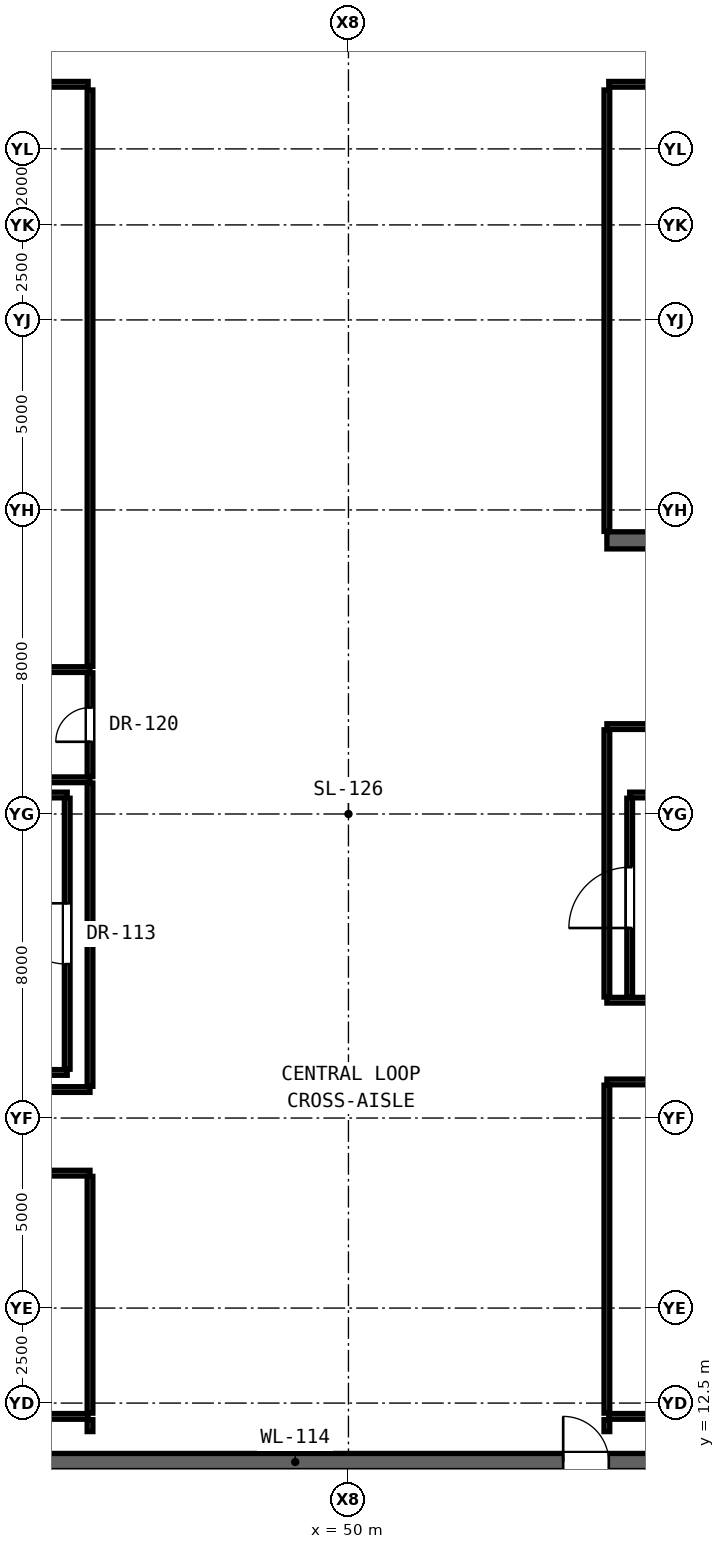
"""IFC4 building model, lengths in metres.
Left out: names, types, materials, properties, quantities, classifications, styles, units other than length and angle.
Written with IfcOpenShell. Run it as: python <this file> out.ifc"""

import sys

from ifc_helpers import new_model, si_unit, direction, frame, frame_2d, origin, place, context, subcontext, project, spatial, rectangle, extrude, element, fill, save


model = new_model("IFC4")
c1 = context("Model", 3, precision=1e-05, world=origin(), true_north=direction((0.0, 1.0)))
c2 = subcontext(c1, "Body", "Model", "MODEL_VIEW")
j1 = project(units=[si_unit("LENGTHUNIT", "METRE"), si_unit("PLANEANGLEUNIT", "RADIAN")], contexts=[c1])
p1 = place(None, origin())
s1 = spatial("IfcSite", under=j1, at=p1, CompositionType="ELEMENT")
p2 = place(p1, origin())
s2 = spatial("IfcBuilding", under=s1, at=p2, CompositionType="ELEMENT")
p3 = place(p2, frame((0.0, 0.0, -4.8)))
s3 = spatial("IfcBuildingStorey", under=s2, at=p3, CompositionType="ELEMENT", Elevation=-4.8)
p4 = place(p3, frame((3.2, 10.95, 0.0), z_axis=(0.0, 0.0, 1.0), x_axis=(1.0, 0.0, 0.0)))
e1 = element("IfcWall", 1, at=p4, inside=s3, PredefinedType="SHEAR", context=c2, shape_type="SweptSolid", body=[
    extrude(rectangle(XDim=90.8, YDim=0.45, at=frame_2d((45.4, 0.0))), origin(), (0.0, 0.0, 1.0), 4.48),
])
p5 = place(p4, frame((18.57, 0.0, 0.0)))
e2 = element("IfcOpeningElement", 2, at=p5, cuts=e1, PredefinedType="OPENING", context=c2, shape_type="SweptSolid", body=[
    extrude(rectangle(XDim=1.15, YDim=2.2, at=frame_2d((0.575, 1.1))), frame((0.0, 0.235, 0.0), z_axis=(0.0, -1.0, 0.0), x_axis=(1.0, 0.0, 0.0)), (0.0, 0.0, 1.0), 0.47),
])
p6 = place(p4, frame((66.17, 0.0, 0.0)))
e3 = element("IfcOpeningElement", 3, at=p6, cuts=e1, PredefinedType="OPENING", context=c2, shape_type="SweptSolid", body=[
    extrude(rectangle(XDim=1.15, YDim=2.2, at=frame_2d((0.575, 1.1))), frame((0.0, 0.235, 0.0), z_axis=(0.0, -1.0, 0.0), x_axis=(1.0, 0.0, 0.0)), (0.0, 0.0, 1.0), 0.47),
])
p7 = place(p4, frame((31.0, 0.0, 0.0)))
e4 = element("IfcOpeningElement", 4, at=p7, cuts=e1, PredefinedType="OPENING", context=c2, shape_type="SweptSolid", body=[
    extrude(rectangle(XDim=1.2, YDim=2.25, at=frame_2d((0.6, 1.125))), frame((0.0, 0.235, 0.0), z_axis=(0.0, -1.0, 0.0), x_axis=(1.0, 0.0, 0.0)), (0.0, 0.0, 1.0), 0.47),
])
p8 = place(p4, frame((52.45, 0.0, 0.0)))
e5 = element("IfcOpeningElement", 5, at=p8, cuts=e1, PredefinedType="OPENING", context=c2, shape_type="SweptSolid", body=[
    extrude(rectangle(XDim=1.2, YDim=2.25, at=frame_2d((0.6, 1.125))), frame((0.0, 0.235, 0.0), z_axis=(0.0, -1.0, 0.0), x_axis=(1.0, 0.0, 0.0)), (0.0, 0.0, 1.0), 0.47),
])
p9 = place(p3, frame((30.02, 12.15, 0.0), z_axis=(0.0, 0.0, 1.0), x_axis=(1.0, 0.0, 0.0)))
e6 = element("IfcWall", 6, at=p9, inside=s3, PredefinedType="PARTITIONING", context=c2, shape_type="SweptSolid", body=[
    extrude(rectangle(XDim=13.13, YDim=0.15, at=frame_2d((6.565, 0.0))), origin(), (0.0, 0.0, 1.0), 3.252),
])
p10 = place(p3, frame((56.85, 12.15, 0.0), z_axis=(0.0, 0.0, 1.0), x_axis=(1.0, 0.0, 0.0)))
e7 = element("IfcWall", 7, at=p10, inside=s3, PredefinedType="PARTITIONING", context=c2, shape_type="SweptSolid", body=[
    extrude(rectangle(XDim=29.6, YDim=0.15, at=frame_2d((14.8, 0.0))), origin(), (0.0, 0.0, 1.0), 3.252),
])
p11 = place(p3, frame((30.02, 18.55, 0.0), z_axis=(0.0, 0.0, 1.0), x_axis=(1.0, 0.0, 0.0)))
e8 = element("IfcWall", 8, at=p11, inside=s3, PredefinedType="PARTITIONING", context=c2, shape_type="SweptSolid", body=[
    extrude(rectangle(XDim=13.18, YDim=0.15, at=frame_2d((6.59, 0.0))), origin(), (0.0, 0.0, 1.0), 3.252),
])
p12 = place(p3, frame((10.0, 20.75, 0.0), z_axis=(0.0, 0.0, 1.0), x_axis=(1.0, 0.0, 0.0)))
e9 = element("IfcWall", 9, at=p12, inside=s3, PredefinedType="PARTITIONING", context=c2, shape_type="SweptSolid", body=[
    extrude(rectangle(XDim=33.2, YDim=0.15, at=frame_2d((16.6, 0.0))), origin(), (0.0, 0.0, 1.0), 3.252),
])
p13 = place(p12, frame((14.4, 0.0, 0.0)))
e10 = element("IfcOpeningElement", 10, at=p13, cuts=e9, PredefinedType="OPENING", context=c2, shape_type="SweptSolid", body=[
    extrude(rectangle(XDim=1.6, YDim=2.3, at=frame_2d((0.8, 1.15))), frame((0.0, 0.085, 0.0), z_axis=(0.0, -1.0, 0.0), x_axis=(1.0, 0.0, 0.0)), (0.0, 0.0, 1.0), 0.17),
])
p14 = place(p3, frame((56.8, 20.95, 0.0), z_axis=(0.0, 0.0, 1.0), x_axis=(1.0, 0.0, 0.0)))
e11 = element("IfcWall", 11, at=p14, inside=s3, PredefinedType="PARTITIONING", context=c2, shape_type="SweptSolid", body=[
    extrude(rectangle(XDim=10.83, YDim=0.15, at=frame_2d((5.415, 0.0))), origin(), (0.0, 0.0, 1.0), 3.252),
])
p15 = place(p3, frame((31.0, 21.2, 0.0), z_axis=(0.0, 0.0, 1.0), x_axis=(1.0, 0.0, 0.0)))
e12 = element("IfcWall", 12, at=p15, inside=s3, PredefinedType="PARTITIONING", context=c2, shape_type="SweptSolid", body=[
    extrude(rectangle(XDim=11.6, YDim=0.15, at=frame_2d((5.8, 0.0))), origin(), (0.0, 0.0, 1.0), 3.252),
])
p16 = place(p3, frame((56.8, 23.1, 0.0), z_axis=(0.0, 0.0, 1.0), x_axis=(1.0, 0.0, 0.0)))
e13 = element("IfcWall", 13, at=p16, inside=s3, PredefinedType="PARTITIONING", context=c2, shape_type="SweptSolid", body=[
    extrude(rectangle(XDim=29.7, YDim=0.15, at=frame_2d((14.85, 0.0))), origin(), (0.0, 0.0, 1.0), 3.252),
])
p17 = place(p3, frame((31.0, 28.5, 0.0), z_axis=(0.0, 0.0, 1.0), x_axis=(1.0, 0.0, 0.0)))
e14 = element("IfcWall", 14, at=p17, inside=s3, PredefinedType="PARTITIONING", context=c2, shape_type="SweptSolid", body=[
    extrude(rectangle(XDim=11.6, YDim=0.15, at=frame_2d((5.8, 0.0))), origin(), (0.0, 0.0, 1.0), 3.252),
])
p18 = place(p3, frame((57.4, 28.5, 0.0), z_axis=(0.0, 0.0, 1.0), x_axis=(1.0, 0.0, 0.0)))
e15 = element("IfcWall", 15, at=p18, inside=s3, PredefinedType="PARTITIONING", context=c2, shape_type="SweptSolid", body=[
    extrude(rectangle(XDim=9.2, YDim=0.15, at=frame_2d((4.6, 0.0))), origin(), (0.0, 0.0, 1.0), 3.252),
])
p19 = place(p3, frame((31.0, 28.9, 0.0), z_axis=(0.0, 0.0, 1.0), x_axis=(1.0, 0.0, 0.0)))
e16 = element("IfcWall", 16, at=p19, inside=s3, PredefinedType="PARTITIONING", context=c2, shape_type="SweptSolid", body=[
    extrude(rectangle(XDim=12.2, YDim=0.15, at=frame_2d((6.1, 0.0))), origin(), (0.0, 0.0, 1.0), 3.252),
])
p20 = place(p19, frame((3.195, 0.0, 0.0)))
e17 = element("IfcOpeningElement", 17, at=p20, cuts=e16, PredefinedType="OPENING", context=c2, shape_type="SweptSolid", body=[
    extrude(rectangle(XDim=0.85, YDim=2.01, at=frame_2d((0.425, 1.005))), frame((0.0, 0.085, 0.0), z_axis=(0.0, -1.0, 0.0), x_axis=(1.0, 0.0, 0.0)), (0.0, 0.0, 1.0), 0.17),
])
p21 = place(p3, frame((56.8, 30.3, 0.0), z_axis=(0.0, 0.0, 1.0), x_axis=(1.0, 0.0, 0.0)))
e18 = element("IfcWall", 18, at=p21, inside=s3, PredefinedType="PARTITIONING", context=c2, shape_type="SweptSolid", body=[
    extrude(rectangle(XDim=29.7, YDim=0.15, at=frame_2d((14.85, 0.0))), origin(), (0.0, 0.0, 1.0), 3.252),
])
p22 = place(p3, frame((31.0, 31.8, 0.0), z_axis=(0.0, 0.0, 1.0), x_axis=(1.0, 0.0, 0.0)))
e19 = element("IfcWall", 19, at=p22, inside=s3, PredefinedType="PARTITIONING", context=c2, shape_type="SweptSolid", body=[
    extrude(rectangle(XDim=12.2, YDim=0.15, at=frame_2d((6.1, 0.0))), origin(), (0.0, 0.0, 1.0), 3.252),
])
p23 = place(p3, frame((56.8, 35.2, 0.0), z_axis=(0.0, 0.0, 1.0), x_axis=(1.0, 0.0, 0.0)))
e20 = element("IfcWall", 20, at=p23, inside=s3, PredefinedType="SHEAR", context=c2, shape_type="SweptSolid", body=[
    extrude(rectangle(XDim=3.485, YDim=0.45, at=frame_2d((1.742, 0.0))), origin(), (0.0, 0.0, 1.0), 4.48),
])
p24 = place(p3, frame((9.85, 47.2, 0.0), z_axis=(0.0, 0.0, 1.0), x_axis=(1.0, 0.0, 0.0)))
e21 = element("IfcWall", 21, at=p24, inside=s3, PredefinedType="PARTITIONING", context=c2, shape_type="SweptSolid", body=[
    extrude(rectangle(XDim=33.3, YDim=0.15, at=frame_2d((16.65, 0.0))), origin(), (0.0, 0.0, 1.0), 4.3),
])
p25 = place(p3, frame((56.85, 47.2, 0.0), z_axis=(0.0, 0.0, 1.0), x_axis=(1.0, 0.0, 0.0)))
e22 = element("IfcWall", 22, at=p25, inside=s3, PredefinedType="PARTITIONING", context=c2, shape_type="SweptSolid", body=[
    extrude(rectangle(XDim=29.6, YDim=0.15, at=frame_2d((14.8, 0.0))), origin(), (0.0, 0.0, 1.0), 4.3),
])
p26 = place(p3, frame((42.6, 21.285, 0.0), z_axis=(0.0, 0.0, 1.0), x_axis=(0.0, 1.0, 0.0)))
e23 = element("IfcWall", 23, at=p26, inside=s3, PredefinedType="PARTITIONING", context=c2, shape_type="SweptSolid", body=[
    extrude(rectangle(XDim=7.13, YDim=0.15, at=frame_2d((3.565, 0.0))), origin(), (0.0, 0.0, 1.0), 4.3),
])
p27 = place(p26, frame((2.765, 0.0, 0.0)))
e24 = element("IfcOpeningElement", 24, at=p27, cuts=e23, PredefinedType="OPENING", context=c2, shape_type="SweptSolid", body=[
    extrude(rectangle(XDim=1.6, YDim=2.3, at=frame_2d((0.8, 1.15))), frame((0.0, 0.085, 0.0), z_axis=(0.0, -1.0, 0.0), x_axis=(1.0, 0.0, 0.0)), (0.0, 0.0, 1.0), 0.17),
])
p28 = place(p3, frame((43.2, 11.75, 0.0), z_axis=(0.0, 0.0, 1.0), x_axis=(0.0, 1.0, 0.0)))
e25 = element("IfcWall", 25, at=p28, inside=s3, PredefinedType="PARTITIONING", context=c2, shape_type="SweptSolid", body=[
    extrude(rectangle(XDim=0.315, YDim=0.15, at=frame_2d((0.157, 0.0))), origin(), (0.0, 0.0, 1.0), 4.3),
])
p29 = place(p3, frame((43.2, 12.235, 0.0), z_axis=(0.0, 0.0, 1.0), x_axis=(0.0, 1.0, 0.0)))
e26 = element("IfcWall", 26, at=p29, inside=s3, PredefinedType="PARTITIONING", context=c2, shape_type="SweptSolid", body=[
    extrude(rectangle(XDim=6.23, YDim=0.15, at=frame_2d((3.115, 0.0))), origin(), (0.0, 0.0, 1.0), 3.252),
])
p30 = place(p3, frame((43.2, 20.835, 0.0), z_axis=(0.0, 0.0, 1.0), x_axis=(0.0, 1.0, 0.0)))
e27 = element("IfcWall", 27, at=p30, inside=s3, PredefinedType="PARTITIONING", context=c2, shape_type="SweptSolid", body=[
    extrude(rectangle(XDim=7.98, YDim=0.15, at=frame_2d((3.99, 0.0))), origin(), (0.0, 0.0, 1.0), 4.3),
])
p31 = place(p3, frame((43.2, 28.985, 0.0), z_axis=(0.0, 0.0, 1.0), x_axis=(0.0, 1.0, 0.0)))
e28 = element("IfcWall", 28, at=p31, inside=s3, PredefinedType="PARTITIONING", context=c2, shape_type="SweptSolid", body=[
    extrude(rectangle(XDim=2.73, YDim=0.15, at=frame_2d((1.365, 0.0))), origin(), (0.0, 0.0, 1.0), 4.3),
])
p32 = place(p31, frame((0.915, 0.0, 0.0)))
e29 = element("IfcOpeningElement", 29, at=p32, cuts=e28, PredefinedType="OPENING", context=c2, shape_type="SweptSolid", body=[
    extrude(rectangle(XDim=0.9, YDim=2.1, at=frame_2d((0.45, 1.05))), frame((0.0, 0.085, 0.0), z_axis=(0.0, -1.0, 0.0), x_axis=(1.0, 0.0, 0.0)), (0.0, 0.0, 1.0), 0.17),
])
p33 = place(p3, frame((43.2, 31.885, 0.0), z_axis=(0.0, 0.0, 1.0), x_axis=(0.0, 1.0, 0.0)))
e30 = element("IfcWall", 30, at=p33, inside=s3, PredefinedType="PARTITIONING", context=c2, shape_type="SweptSolid", body=[
    extrude(rectangle(XDim=15.165, YDim=0.15, at=frame_2d((7.583, 0.0))), origin(), (0.0, 0.0, 1.0), 3.252),
])
p34 = place(p3, frame((56.8, 11.75, 0.0), z_axis=(0.0, 0.0, 1.0), x_axis=(0.0, 1.0, 0.0)))
e31 = element("IfcWall", 31, at=p34, inside=s3, PredefinedType="PARTITIONING", context=c2, shape_type="SweptSolid", body=[
    extrude(rectangle(XDim=0.315, YDim=0.15, at=frame_2d((0.157, 0.0))), origin(), (0.0, 0.0, 1.0), 4.3),
])
p35 = place(p3, frame((56.8, 12.235, 0.0), z_axis=(0.0, 0.0, 1.0), x_axis=(0.0, 1.0, 0.0)))
e32 = element("IfcWall", 32, at=p35, inside=s3, PredefinedType="PARTITIONING", context=c2, shape_type="SweptSolid", body=[
    extrude(rectangle(XDim=8.63, YDim=0.15, at=frame_2d((4.315, 0.0))), origin(), (0.0, 0.0, 1.0), 3.252),
])
p36 = place(p3, frame((56.8, 23.185, 0.0), z_axis=(0.0, 0.0, 1.0), x_axis=(0.0, 1.0, 0.0)))
e33 = element("IfcWall", 33, at=p36, inside=s3, PredefinedType="PARTITIONING", context=c2, shape_type="SweptSolid", body=[
    extrude(rectangle(XDim=7.03, YDim=0.15, at=frame_2d((3.515, 0.0))), origin(), (0.0, 0.0, 1.0), 4.3),
])
p37 = place(p3, frame((56.8, 35.435, 0.0), z_axis=(0.0, 0.0, 1.0), x_axis=(0.0, 1.0, 0.0)))
e34 = element("IfcWall", 34, at=p37, inside=s3, PredefinedType="PARTITIONING", context=c2, shape_type="SweptSolid", body=[
    extrude(rectangle(XDim=11.615, YDim=0.15, at=frame_2d((5.808, 0.0))), origin(), (0.0, 0.0, 1.0), 3.252),
])
p38 = place(p3, frame((57.4, 23.185, 0.0), z_axis=(0.0, 0.0, 1.0), x_axis=(0.0, 1.0, 0.0)))
e35 = element("IfcWall", 35, at=p38, inside=s3, PredefinedType="PARTITIONING", context=c2, shape_type="SweptSolid", body=[
    extrude(rectangle(XDim=5.23, YDim=0.15, at=frame_2d((2.615, 0.0))), origin(), (0.0, 0.0, 1.0), 4.3),
])
p39 = place(p38, frame((1.815, 0.0, 0.0)))
e36 = element("IfcOpeningElement", 36, at=p39, cuts=e35, PredefinedType="OPENING", context=c2, shape_type="SweptSolid", body=[
    extrude(rectangle(XDim=1.6, YDim=2.3, at=frame_2d((0.8, 1.15))), frame((0.0, 0.085, 0.0), z_axis=(0.0, -1.0, 0.0), x_axis=(1.0, 0.0, 0.0)), (0.0, 0.0, 1.0), 0.17),
])
p40 = place(p27, origin())
e37 = element("IfcDoor", 37, at=p40, inside=s3, OperationType="SINGLE_SWING_RIGHT", PredefinedType="DOOR", context=c2, shape_type="SweptSolid", body=[
    extrude(rectangle(XDim=1.6, YDim=2.3, at=frame_2d((0.8, 1.15))), frame((0.0, 0.025, 0.0), z_axis=(0.0, -1.0, 0.0), x_axis=(1.0, 0.0, 0.0)), (0.0, 0.0, 1.0), 0.05),
])
fill(e24, e37)
p41 = place(p39, origin())
e38 = element("IfcDoor", 38, at=p41, inside=s3, OperationType="SINGLE_SWING_LEFT", PredefinedType="DOOR", context=c2, shape_type="SweptSolid", body=[
    extrude(rectangle(XDim=1.6, YDim=2.3, at=frame_2d((0.8, 1.15))), frame((0.0, 0.025, 0.0), z_axis=(0.0, -1.0, 0.0), x_axis=(1.0, 0.0, 0.0)), (0.0, 0.0, 1.0), 0.05),
])
fill(e36, e38)
p42 = place(p32, origin())
e39 = element("IfcDoor", 39, at=p42, inside=s3, OperationType="SINGLE_SWING_LEFT", PredefinedType="DOOR", context=c2, shape_type="SweptSolid", body=[
    extrude(rectangle(XDim=0.9, YDim=2.1, at=frame_2d((0.45, 1.05))), frame((0.0, 0.025, 0.0), z_axis=(0.0, -1.0, 0.0), x_axis=(1.0, 0.0, 0.0)), (0.0, 0.0, 1.0), 0.05),
])
fill(e29, e39)
p43 = place(p8, origin())
e40 = element("IfcDoor", 40, at=p43, inside=s3, OperationType="SINGLE_SWING_LEFT", PredefinedType="DOOR", context=c2, shape_type="SweptSolid", body=[
    extrude(rectangle(XDim=1.2, YDim=2.25, at=frame_2d((0.6, 1.125))), frame((0.0, 0.025, 0.0), z_axis=(0.0, -1.0, 0.0), x_axis=(1.0, 0.0, 0.0)), (0.0, 0.0, 1.0), 0.05),
])
fill(e5, e40)
save(model, sys.argv[1])
